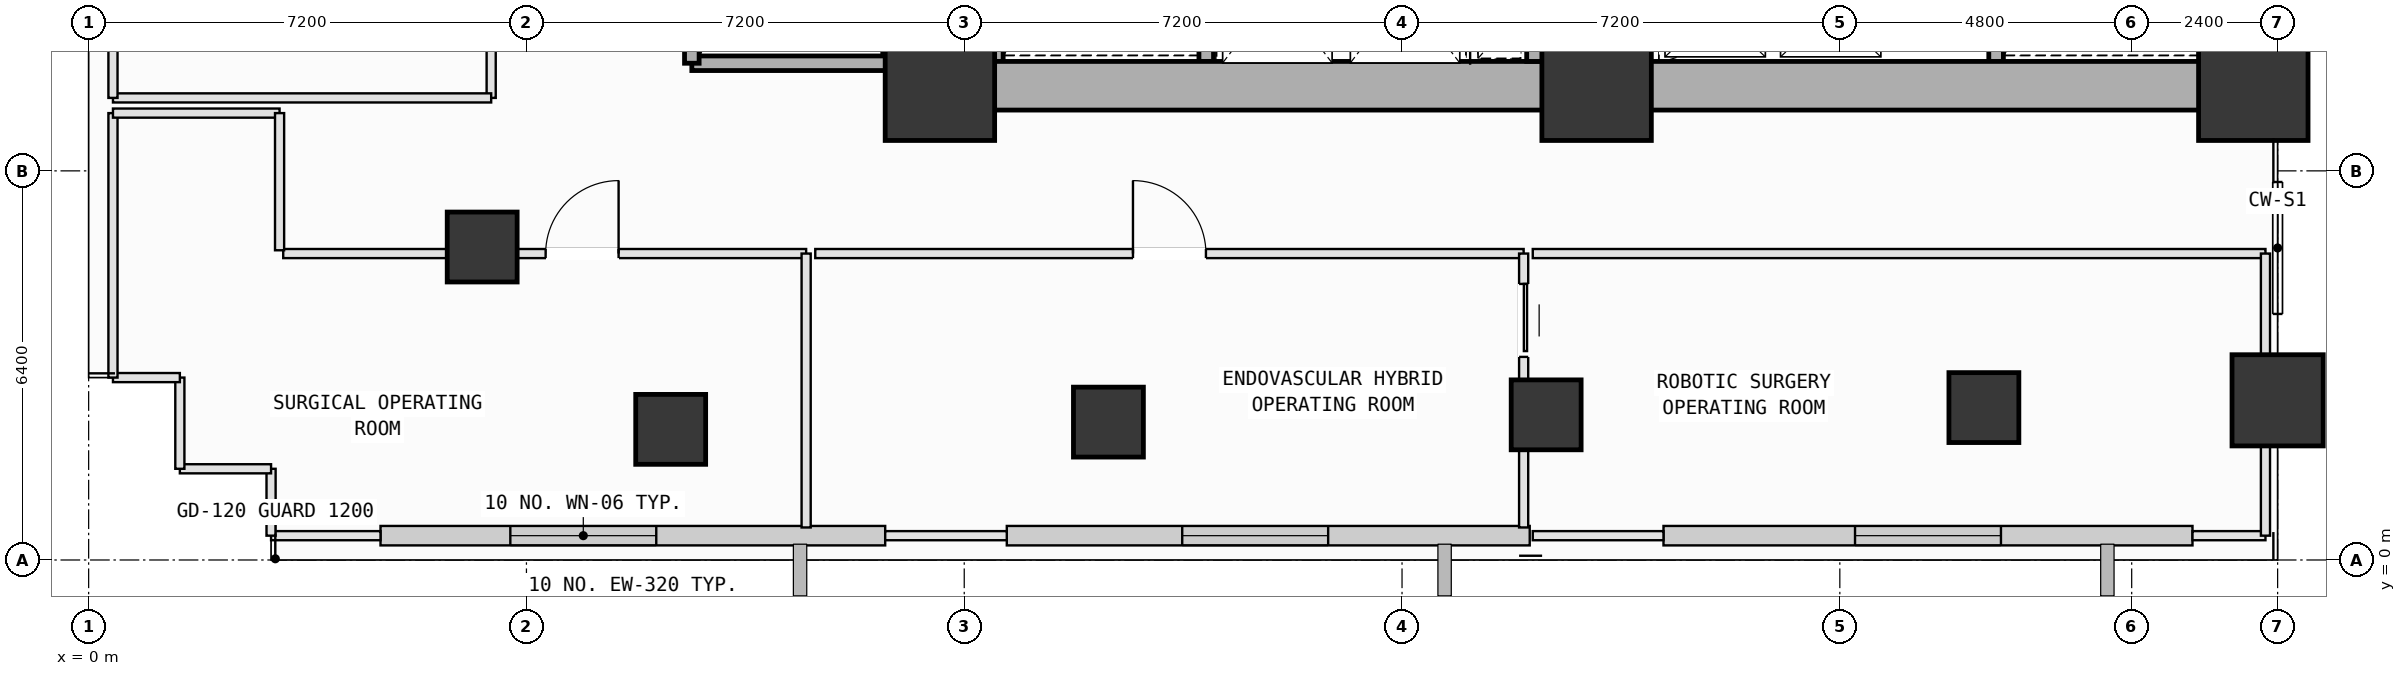
"""IFC4 building model, lengths in metres.
Left out: names, types, materials, properties, quantities, classifications, styles, units other than length and angle.
Written with IfcOpenShell. Run it as: python <this file> out.ifc"""

import sys

from ifc_helpers import new_model, si_unit, direction, frame, frame_2d, origin, origin_2d, place, context, subcontext, project, spatial, rectangle, extrude, element, fill, save


model = new_model("IFC4")
c1 = context("Model", 3, precision=1e-05, world=origin(), true_north=direction((0.0, 1.0)))
c2 = subcontext(c1, "Body", "Model", "MODEL_VIEW")
j1 = project(units=[si_unit("LENGTHUNIT", "METRE"), si_unit("PLANEANGLEUNIT", "RADIAN")], contexts=[c1])
p1 = place(None, origin())
s1 = spatial("IfcSite", under=j1, at=p1, CompositionType="ELEMENT")
p2 = place(p1, origin())
s2 = spatial("IfcBuilding", under=s1, at=p2, CompositionType="ELEMENT")
p3 = place(p2, frame((0.0, 0.0, 16.2)))
s3 = spatial("IfcBuildingStorey", under=s2, at=p3, CompositionType="ELEMENT", Elevation=16.2)
for number, where, z_axis, x_axis in (
    (1, (14.0, 7.8, 0.0), (0.0, 0.0, 1.0), (1.0, 0.0, 0.0)),
    (2, (24.8, 7.8, 0.0), (0.0, 0.0, 1.0), (1.0, 0.0, 0.0)),
    (3, (35.6, 7.8, 0.0), (0.0, 0.0, 1.0), (1.0, 0.0, 0.0)),
):
    element("IfcColumn", number, at=place(p3, frame(where, z_axis=z_axis, x_axis=x_axis)), inside=s3, PredefinedType="COLUMN", context=c2, shape_type="SweptSolid", body=[
        extrude(rectangle(XDim=1.8, YDim=1.8, at=origin_2d()), origin(), (0.0, 0.0, 1.0), 5.4),
    ])
p4 = place(p3, frame((36.0, 2.626, 0.0), z_axis=(0.0, 0.0, 1.0), x_axis=(1.0, 0.0, 0.0)))
e4 = element("IfcColumn", 4, at=p4, inside=s3, PredefinedType="PILASTER", context=c2, shape_type="SweptSolid", body=[
    extrude(rectangle(XDim=1.5, YDim=1.5, at=origin_2d()), origin(), (0.0, 0.0, 1.0), 5.4),
])
for number, where, z_axis, x_axis in (
    (5, (9.572, 2.148, 0.0), (0.0, 0.0, 1.0), (1.0, 0.0, 0.0)),
    (6, (16.771, 2.268, 0.0), (0.0, 0.0, 1.0), (1.0, 0.0, 0.0)),
    (7, (23.97, 2.387, 0.0), (0.0, 0.0, 1.0), (1.0, 0.0, 0.0)),
    (8, (31.169, 2.507, 0.0), (0.0, 0.0, 1.0), (1.0, 0.0, 0.0)),
    (9, (6.472, 5.147, 0.0), (0.0, 0.0, 1.0), (1.0, 0.0, 0.0)),
):
    element("IfcColumn", number, at=place(p3, frame(where, z_axis=z_axis, x_axis=x_axis)), inside=s3, PredefinedType="COLUMN", context=c2, shape_type="SweptSolid", body=[
        extrude(rectangle(XDim=1.15, YDim=1.15, at=origin_2d()), origin(), (0.0, 0.0, 1.0), 5.4),
    ])
p5 = place(p3, frame((13.1, 0.4, 0.0), z_axis=(0.0, 0.0, 1.0), x_axis=(-1.0, 0.0, 0.0)))
e10 = element("IfcWall", 10, at=p5, inside=s3, PredefinedType="SOLIDWALL", context=c2, shape_type="SweptSolid", body=[
    extrude(rectangle(XDim=8.3, YDim=0.32, at=frame_2d((4.15, 0.0))), origin(), (0.0, 0.0, 1.0), 4.23),
])
p6 = place(p5, frame((3.765, 0.0, 0.8)))
e11 = element("IfcOpeningElement", 11, at=p6, cuts=e10, PredefinedType="OPENING", context=c2, shape_type="SweptSolid", body=[
    extrude(rectangle(XDim=2.4, YDim=2.2, at=frame_2d((1.2, 1.1))), frame((0.0, 0.17, 0.0), z_axis=(0.0, -1.0, 0.0), x_axis=(1.0, 0.0, 0.0)), (0.0, 0.0, 1.0), 0.34),
])
p7 = place(p3, frame((23.7, 0.4, 0.0), z_axis=(0.0, 0.0, 1.0), x_axis=(-1.0, 0.0, 0.0)))
e12 = element("IfcWall", 12, at=p7, inside=s3, PredefinedType="SOLIDWALL", context=c2, shape_type="SweptSolid", body=[
    extrude(rectangle(XDim=8.6, YDim=0.32, at=frame_2d((4.3, 0.0))), origin(), (0.0, 0.0, 1.0), 4.23),
])
p8 = place(p7, frame((3.315, 0.0, 0.8)))
e13 = element("IfcOpeningElement", 13, at=p8, cuts=e12, PredefinedType="OPENING", context=c2, shape_type="SweptSolid", body=[
    extrude(rectangle(XDim=2.4, YDim=2.2, at=frame_2d((1.2, 1.1))), frame((0.0, 0.17, 0.0), z_axis=(0.0, -1.0, 0.0), x_axis=(1.0, 0.0, 0.0)), (0.0, 0.0, 1.0), 0.34),
])
p9 = place(p3, frame((34.6, 0.4, 0.0), z_axis=(0.0, 0.0, 1.0), x_axis=(-1.0, 0.0, 0.0)))
e14 = element("IfcWall", 14, at=p9, inside=s3, PredefinedType="SOLIDWALL", context=c2, shape_type="SweptSolid", body=[
    extrude(rectangle(XDim=8.7, YDim=0.32, at=frame_2d((4.35, 0.0))), origin(), (0.0, 0.0, 1.0), 4.23),
])
p10 = place(p9, frame((3.15, 0.0, 0.8)))
e15 = element("IfcOpeningElement", 15, at=p10, cuts=e14, PredefinedType="OPENING", context=c2, shape_type="SweptSolid", body=[
    extrude(rectangle(XDim=2.4, YDim=2.2, at=frame_2d((1.2, 1.1))), frame((0.0, 0.17, 0.0), z_axis=(0.0, -1.0, 0.0), x_axis=(1.0, 0.0, 0.0)), (0.0, 0.0, 1.0), 0.34),
])
for number, where, z_axis, x_axis in (
    (16, (18.38, 15.12, 0.0), (0.0, 0.0, 1.0), (0.0, -1.0, 0.0)),
    (17, (14.92, 8.2, 0.0), (0.0, 0.0, 1.0), (0.0, 1.0, 0.0)),
    (18, (34.83, 15.12, 0.0), (0.0, 0.0, 1.0), (0.0, -1.0, 0.0)),
    (19, (31.37, 8.2, 0.0), (0.0, 0.0, 1.0), (0.0, 1.0, 0.0)),
):
    element("IfcWall", number, at=place(p3, frame(where, z_axis=z_axis, x_axis=x_axis)), inside=s3, PredefinedType="SOLIDWALL", context=c2, shape_type="SweptSolid", body=[
        extrude(rectangle(XDim=6.92, YDim=0.24, at=frame_2d((3.46, 0.0))), origin(), (0.0, 0.0, 1.0), 5.15),
    ])
p11 = place(p3, frame((13.18, 15.22, 0.0), z_axis=(0.0, 0.0, 1.0), x_axis=(0.0, -1.0, 0.0)))
e20 = element("IfcWall", 20, at=p11, inside=s3, PredefinedType="SOLIDWALL", context=c2, shape_type="SweptSolid", body=[
    extrude(rectangle(XDim=7.05, YDim=0.24, at=frame_2d((3.525, 0.0))), origin(), (0.0, 0.0, 1.0), 5.15),
])
p12 = place(p3, frame((13.18, 8.17, 0.0), z_axis=(0.0, 0.0, 1.0), x_axis=(-1.0, 0.0, 0.0)))
e21 = element("IfcWall", 21, at=p12, inside=s3, PredefinedType="SOLIDWALL", context=c2, shape_type="SweptSolid", body=[
    extrude(rectangle(XDim=3.26, YDim=0.24, at=frame_2d((1.63, 0.0))), origin(), (0.0, 0.0, 1.0), 5.15),
])
p13 = place(p3, frame((9.92, 8.17, 0.0), z_axis=(0.0, 0.0, 1.0), x_axis=(0.0, 1.0, 0.0)))
e22 = element("IfcWall", 22, at=p13, inside=s3, PredefinedType="SOLIDWALL", context=c2, shape_type="SweptSolid", body=[
    extrude(rectangle(XDim=7.05, YDim=0.24, at=frame_2d((3.525, 0.0))), origin(), (0.0, 0.0, 1.0), 5.15),
])
for number, where, z_axis, x_axis in (
    (23, (14.0, 7.8, 0.0), (0.0, 0.0, 1.0), (1.0, 0.0, 0.0)),
    (24, (24.8, 7.8, 0.0), (0.0, 0.0, 1.0), (1.0, 0.0, 0.0)),
):
    element("IfcWall", number, at=place(p3, frame(where, z_axis=z_axis, x_axis=x_axis)), inside=s3, PredefinedType="SHEAR", context=c2, shape_type="SweptSolid", body=[
        extrude(rectangle(XDim=10.8, YDim=0.8, at=frame_2d((5.4, 0.0))), origin(), (0.0, 0.0, 1.0), 5.15),
    ])
for number, where, z_axis, x_axis in (
    (25, (35.6, 7.8, 0.0), (0.0, 0.0, 1.0), (0.0, 1.0, 0.0)),
    (26, (14.0, 16.8, 0.0), (0.0, 0.0, 1.0), (0.0, -1.0, 0.0)),
):
    element("IfcWall", number, at=place(p3, frame(where, z_axis=z_axis, x_axis=x_axis)), inside=s3, PredefinedType="SHEAR", context=c2, shape_type="SweptSolid", body=[
        extrude(rectangle(XDim=9.0, YDim=0.8, at=frame_2d((4.5, 0.0))), origin(), (0.0, 0.0, 1.0), 5.15),
    ])
p14 = place(p3, frame((23.8, 8.2, 0.0), z_axis=(0.0, 0.0, 1.0), x_axis=(0.0, 1.0, 0.0)))
e27 = element("IfcWall", 27, at=p14, inside=s3, PredefinedType="SOLIDWALL", context=c2, shape_type="SweptSolid", body=[
    extrude(rectangle(XDim=2.48, YDim=0.3, at=frame_2d((1.24, 0.0))), origin(), (0.0, 0.0, 1.0), 5.15),
])
p15 = place(p3, frame((6.62, 19.3, 0.0), z_axis=(0.0, 0.0, 1.0), x_axis=(0.0, -1.0, 0.0)))
e28 = element("IfcWall", 28, at=p15, inside=s3, PredefinedType="PARTITIONING", context=c2, shape_type="SweptSolid", body=[
    extrude(rectangle(XDim=11.7, YDim=0.15, at=frame_2d((5.85, 0.0))), origin(), (0.0, 0.0, 1.0), 4.235),
])
p16 = place(p15, frame((5.25, 0.0, 0.0)))
e29 = element("IfcOpeningElement", 29, at=p16, cuts=e28, PredefinedType="OPENING", context=c2, shape_type="SweptSolid", body=[
    extrude(rectangle(XDim=1.2, YDim=2.15, at=frame_2d((0.6, 1.075))), frame((0.0, 0.085, 0.0), z_axis=(0.0, -1.0, 0.0), x_axis=(1.0, 0.0, 0.0)), (0.0, 0.0, 1.0), 0.17),
])
p17 = place(p3, frame((6.62, 7.6, 0.0), z_axis=(0.0, 0.0, 1.0), x_axis=(-1.0, 0.0, 0.0)))
e30 = element("IfcWall", 30, at=p17, inside=s3, PredefinedType="PARTITIONING", context=c2, shape_type="SweptSolid", body=[
    extrude(rectangle(XDim=6.22, YDim=0.15, at=frame_2d((3.11, 0.0))), origin(), (0.0, 0.0, 1.0), 5.15),
])
p18 = place(p3, frame((0.4, 7.6, 0.0), z_axis=(0.0, 0.0, 1.0), x_axis=(0.0, 1.0, 0.0)))
e31 = element("IfcWall", 31, at=p18, inside=s3, PredefinedType="PARTITIONING", context=c2, shape_type="SweptSolid", body=[
    extrude(rectangle(XDim=6.0, YDim=0.15, at=frame_2d((3.0, 0.0))), origin(), (0.0, 0.0, 1.0), 5.15),
])
p19 = place(p3, frame((3.2, 5.04, 0.0), z_axis=(0.0, 0.0, 1.0), x_axis=(1.0, 0.0, 0.0)))
e32 = element("IfcWall", 32, at=p19, inside=s3, PredefinedType="PARTITIONING", context=c2, shape_type="SweptSolid", body=[
    extrude(rectangle(XDim=8.6, YDim=0.15, at=frame_2d((4.3, 0.0))), origin(), (0.0, 0.0, 1.0), 4.235),
])
p20 = place(p19, frame((4.316, 0.0, 0.0)))
e33 = element("IfcOpeningElement", 33, at=p20, cuts=e32, PredefinedType="OPENING", context=c2, shape_type="SweptSolid", body=[
    extrude(rectangle(XDim=1.2, YDim=2.15, at=frame_2d((0.6, 1.075))), frame((0.0, 0.085, 0.0), z_axis=(0.0, -1.0, 0.0), x_axis=(1.0, 0.0, 0.0)), (0.0, 0.0, 1.0), 0.17),
])
p21 = place(p3, frame((11.8, 5.04, 0.0), z_axis=(0.0, 0.0, 1.0), x_axis=(0.0, -1.0, 0.0)))
e34 = element("IfcWall", 34, at=p21, inside=s3, PredefinedType="PARTITIONING", context=c2, shape_type="SweptSolid", body=[
    extrude(rectangle(XDim=4.505, YDim=0.15, at=frame_2d((2.252, 0.0))), origin(), (0.0, 0.0, 1.0), 5.15),
])
p22 = place(p3, frame((4.8, 0.4, 0.0), z_axis=(0.0, 0.0, 1.0), x_axis=(-1.0, 0.0, 0.0)))
e35 = element("IfcWall", 35, at=p22, inside=s3, PredefinedType="PARTITIONING", context=c2, shape_type="SweptSolid", body=[
    extrude(rectangle(XDim=1.8, YDim=0.15, at=frame_2d((0.9, 0.0))), origin(), (0.0, 0.0, 1.0), 5.15),
])
p23 = place(p3, frame((3.0, 0.4, 0.0), z_axis=(0.0, 0.0, 1.0), x_axis=(0.0, 1.0, 0.0)))
e36 = element("IfcWall", 36, at=p23, inside=s3, PredefinedType="PARTITIONING", context=c2, shape_type="SweptSolid", body=[
    extrude(rectangle(XDim=1.1, YDim=0.15, at=frame_2d((0.55, 0.0))), origin(), (0.0, 0.0, 1.0), 5.15),
])
for number, where, z_axis, x_axis in (
    (37, (3.0, 1.5, 0.0), (0.0, 0.0, 1.0), (-1.0, 0.0, 0.0)),
    (38, (1.5, 1.5, 0.0), (0.0, 0.0, 1.0), (0.0, 1.0, 0.0)),
):
    element("IfcWall", number, at=place(p3, frame(where, z_axis=z_axis, x_axis=x_axis)), inside=s3, PredefinedType="PARTITIONING", context=c2, shape_type="SweptSolid", body=[
        extrude(rectangle(XDim=1.5, YDim=0.15, at=frame_2d((0.75, 0.0))), origin(), (0.0, 0.0, 1.0), 5.15),
    ])
p24 = place(p3, frame((1.5, 3.0, 0.0), z_axis=(0.0, 0.0, 1.0), x_axis=(-1.0, 0.0, 0.0)))
e39 = element("IfcWall", 39, at=p24, inside=s3, PredefinedType="PARTITIONING", context=c2, shape_type="SweptSolid", body=[
    extrude(rectangle(XDim=1.1, YDim=0.15, at=frame_2d((0.55, 0.0))), origin(), (0.0, 0.0, 1.0), 5.15),
])
p25 = place(p3, frame((0.4, 3.0, 0.0), z_axis=(0.0, 0.0, 1.0), x_axis=(0.0, 1.0, 0.0)))
e40 = element("IfcWall", 40, at=p25, inside=s3, PredefinedType="PARTITIONING", context=c2, shape_type="SweptSolid", body=[
    extrude(rectangle(XDim=4.35, YDim=0.15, at=frame_2d((2.175, 0.0))), origin(), (0.0, 0.0, 1.0), 5.15),
])
p26 = place(p3, frame((0.4, 7.35, 0.0), z_axis=(0.0, 0.0, 1.0), x_axis=(1.0, 0.0, 0.0)))
e41 = element("IfcWall", 41, at=p26, inside=s3, PredefinedType="PARTITIONING", context=c2, shape_type="SweptSolid", body=[
    extrude(rectangle(XDim=2.74, YDim=0.15, at=frame_2d((1.37, 0.0))), origin(), (0.0, 0.0, 1.0), 5.15),
])
p27 = place(p3, frame((3.14, 7.35, 0.0), z_axis=(0.0, 0.0, 1.0), x_axis=(0.0, -1.0, 0.0)))
e42 = element("IfcWall", 42, at=p27, inside=s3, PredefinedType="PARTITIONING", context=c2, shape_type="SweptSolid", body=[
    extrude(rectangle(XDim=2.256, YDim=0.15, at=frame_2d((1.128, 0.0))), origin(), (0.0, 0.0, 1.0), 5.15),
])
p28 = place(p3, frame((15.1, 0.4, 0.0), z_axis=(0.0, 0.0, 1.0), x_axis=(-1.0, 0.0, 0.0)))
e43 = element("IfcWall", 43, at=p28, inside=s3, PredefinedType="PARTITIONING", context=c2, shape_type="SweptSolid", body=[
    extrude(rectangle(XDim=2.0, YDim=0.15, at=frame_2d((1.0, 0.0))), origin(), (0.0, 0.0, 1.0), 5.15),
])
p29 = place(p3, frame((11.95, 5.04, 0.0), z_axis=(0.0, 0.0, 1.0), x_axis=(1.0, 0.0, 0.0)))
e44 = element("IfcWall", 44, at=p29, inside=s3, PredefinedType="PARTITIONING", context=c2, shape_type="SweptSolid", body=[
    extrude(rectangle(XDim=11.65, YDim=0.15, at=frame_2d((5.825, 0.0))), origin(), (0.0, 0.0, 1.0), 5.15),
])
p30 = place(p29, frame((5.225, 0.0, 0.0)))
e45 = element("IfcOpeningElement", 45, at=p30, cuts=e44, PredefinedType="OPENING", context=c2, shape_type="SweptSolid", body=[
    extrude(rectangle(XDim=1.2, YDim=2.15, at=frame_2d((0.6, 1.075))), frame((0.0, 0.085, 0.0), z_axis=(0.0, -1.0, 0.0), x_axis=(1.0, 0.0, 0.0)), (0.0, 0.0, 1.0), 0.17),
])
p31 = place(p3, frame((23.6, 5.04, 0.0), z_axis=(0.0, 0.0, 1.0), x_axis=(0.0, -1.0, 0.0)))
e46 = element("IfcWall", 46, at=p31, inside=s3, PredefinedType="PARTITIONING", context=c2, shape_type="SweptSolid", body=[
    extrude(rectangle(XDim=4.505, YDim=0.15, at=frame_2d((2.252, 0.0))), origin(), (0.0, 0.0, 1.0), 4.235),
])
p32 = place(p31, frame((0.5, 0.0, 0.0)))
e47 = element("IfcOpeningElement", 47, at=p32, cuts=e46, PredefinedType="OPENING", context=c2, shape_type="SweptSolid", body=[
    extrude(rectangle(XDim=1.2, YDim=2.15, at=frame_2d((0.6, 1.075))), frame((0.0, 0.085, 0.0), z_axis=(0.0, -1.0, 0.0), x_axis=(1.0, 0.0, 0.0)), (0.0, 0.0, 1.0), 0.17),
])
p33 = place(p3, frame((35.8, 0.4, 0.0), z_axis=(0.0, 0.0, 1.0), x_axis=(-1.0, 0.0, 0.0)))
e48 = element("IfcWall", 48, at=p33, inside=s3, PredefinedType="PARTITIONING", context=c2, shape_type="SweptSolid", body=[
    extrude(rectangle(XDim=1.2, YDim=0.15, at=frame_2d((0.6, 0.0))), origin(), (0.0, 0.0, 1.0), 5.15),
])
p34 = place(p3, frame((25.9, 0.4, 0.0), z_axis=(0.0, 0.0, 1.0), x_axis=(-1.0, 0.0, 0.0)))
e49 = element("IfcWall", 49, at=p34, inside=s3, PredefinedType="PARTITIONING", context=c2, shape_type="SweptSolid", body=[
    extrude(rectangle(XDim=2.15, YDim=0.15, at=frame_2d((1.075, 0.0))), origin(), (0.0, 0.0, 1.0), 5.15),
])
p35 = place(p3, frame((23.75, 5.04, 0.0), z_axis=(0.0, 0.0, 1.0), x_axis=(1.0, 0.0, 0.0)))
e50 = element("IfcWall", 50, at=p35, inside=s3, PredefinedType="PARTITIONING", context=c2, shape_type="SweptSolid", body=[
    extrude(rectangle(XDim=12.05, YDim=0.15, at=frame_2d((6.025, 0.0))), origin(), (0.0, 0.0, 1.0), 5.15),
])
p36 = place(p3, frame((35.8, 5.04, 0.0), z_axis=(0.0, 0.0, 1.0), x_axis=(0.0, -1.0, 0.0)))
e51 = element("IfcWall", 51, at=p36, inside=s3, PredefinedType="PARTITIONING", context=c2, shape_type="SweptSolid", body=[
    extrude(rectangle(XDim=4.64, YDim=0.15, at=frame_2d((2.32, 0.0))), origin(), (0.0, 0.0, 1.0), 4.235),
])
p37 = place(p6, origin())
e52 = element("IfcWindow", 52, at=p37, inside=s3, PartitioningType="SINGLE_PANEL", PredefinedType="WINDOW", context=c2, shape_type="SweptSolid", body=[
    extrude(rectangle(XDim=2.4, YDim=2.2, at=frame_2d((1.2, 1.1))), frame((0.0, 0.03, 0.0), z_axis=(0.0, -1.0, 0.0), x_axis=(1.0, 0.0, 0.0)), (0.0, 0.0, 1.0), 0.06),
])
fill(e11, e52)
p38 = place(p8, origin())
e53 = element("IfcWindow", 53, at=p38, inside=s3, PartitioningType="SINGLE_PANEL", PredefinedType="WINDOW", context=c2, shape_type="SweptSolid", body=[
    extrude(rectangle(XDim=2.4, YDim=2.2, at=frame_2d((1.2, 1.1))), frame((0.0, 0.03, 0.0), z_axis=(0.0, -1.0, 0.0), x_axis=(1.0, 0.0, 0.0)), (0.0, 0.0, 1.0), 0.06),
])
fill(e13, e53)
p39 = place(p10, origin())
e54 = element("IfcWindow", 54, at=p39, inside=s3, PartitioningType="SINGLE_PANEL", PredefinedType="WINDOW", context=c2, shape_type="SweptSolid", body=[
    extrude(rectangle(XDim=2.4, YDim=2.2, at=frame_2d((1.2, 1.1))), frame((0.0, 0.03, 0.0), z_axis=(0.0, -1.0, 0.0), x_axis=(1.0, 0.0, 0.0)), (0.0, 0.0, 1.0), 0.06),
])
fill(e15, e54)
p40 = place(p20, origin())
e55 = element("IfcDoor", 55, at=p40, inside=s3, OperationType="SINGLE_SWING_RIGHT", PredefinedType="DOOR", context=c2, shape_type="SweptSolid", body=[
    extrude(rectangle(XDim=1.2, YDim=2.15, at=frame_2d((0.6, 1.075))), frame((0.0, 0.025, 0.0), z_axis=(0.0, -1.0, 0.0), x_axis=(1.0, 0.0, 0.0)), (0.0, 0.0, 1.0), 0.05),
])
fill(e33, e55)
p41 = place(p30, origin())
e56 = element("IfcDoor", 56, at=p41, inside=s3, OperationType="SINGLE_SWING_LEFT", PredefinedType="DOOR", context=c2, shape_type="SweptSolid", body=[
    extrude(rectangle(XDim=1.2, YDim=2.15, at=frame_2d((0.6, 1.075))), frame((0.0, 0.025, 0.0), z_axis=(0.0, -1.0, 0.0), x_axis=(1.0, 0.0, 0.0)), (0.0, 0.0, 1.0), 0.05),
])
fill(e45, e56)
p42 = place(p32, origin())
e57 = element("IfcDoor", 57, at=p42, inside=s3, OperationType="SLIDING_TO_LEFT", PredefinedType="DOOR", context=c2, shape_type="SweptSolid", body=[
    extrude(rectangle(XDim=1.2, YDim=2.15, at=frame_2d((0.6, 1.075))), frame((0.0, 0.025, 0.0), z_axis=(0.0, -1.0, 0.0), x_axis=(1.0, 0.0, 0.0)), (0.0, 0.0, 1.0), 0.05),
])
fill(e47, e57)
save(model, sys.argv[1])
